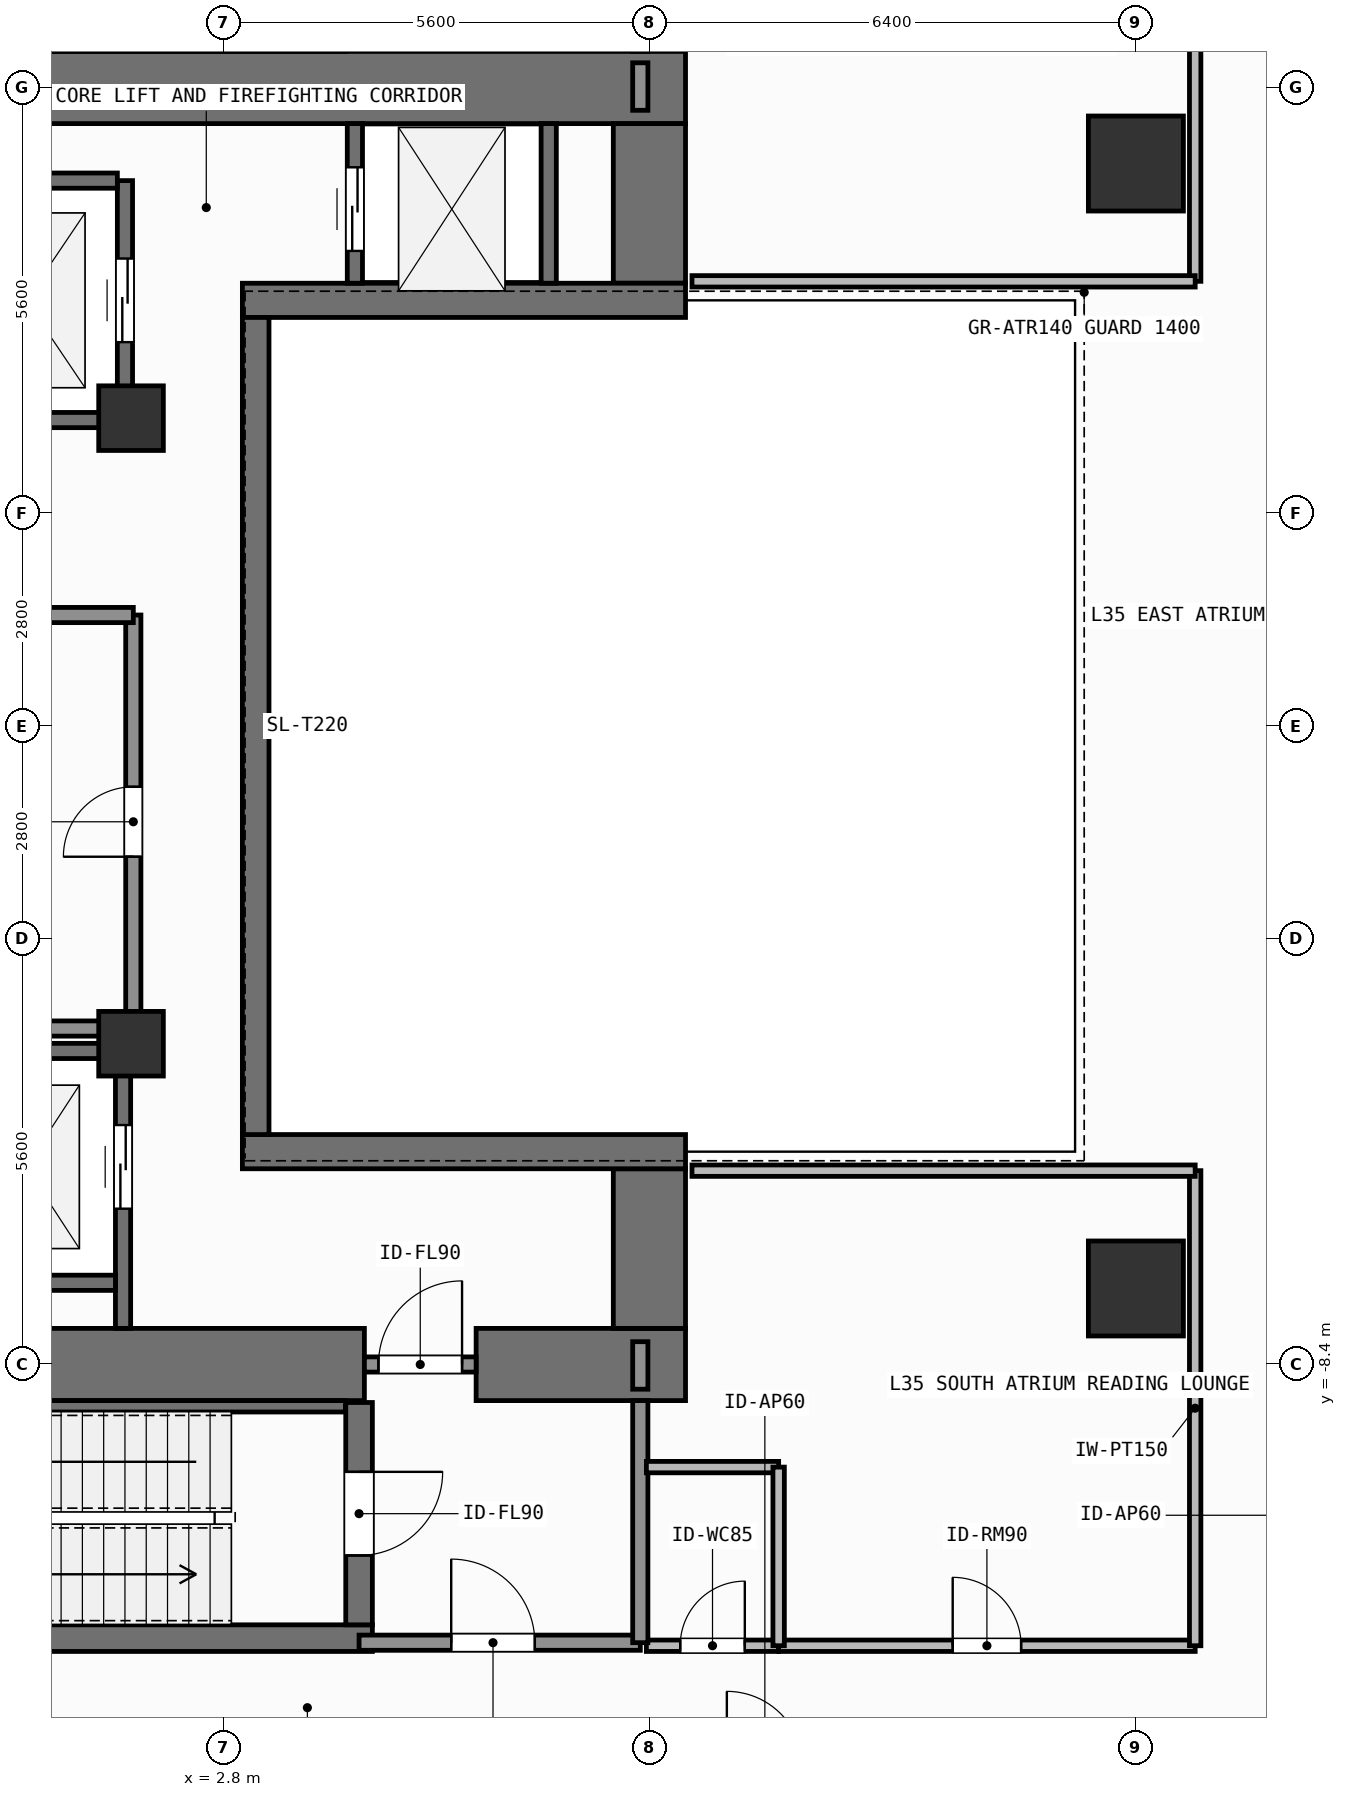
"""IFC4 building model, lengths in metres.
Left out: names, types, materials, properties, quantities, classifications, styles, units other than length and angle.
Written with IfcOpenShell. Run it as: python <this file> out.ifc"""

import sys

from ifc_helpers import new_model, si_unit, direction, frame, frame_2d, origin, origin_2d, place, context, subcontext, project, spatial, rectangle, extrude, element, fill, save


model = new_model("IFC4")
c1 = context("Model", 3, precision=1e-05, world=origin(), true_north=direction((0.0, 1.0)))
c2 = subcontext(c1, "Body", "Model", "MODEL_VIEW")
j1 = project(units=[si_unit("LENGTHUNIT", "METRE"), si_unit("PLANEANGLEUNIT", "RADIAN")], contexts=[c1])
p1 = place(None, origin())
s1 = spatial("IfcSite", under=j1, at=p1, CompositionType="ELEMENT")
p2 = place(p1, origin())
s2 = spatial("IfcBuilding", under=s1, at=p2, CompositionType="ELEMENT")
p3 = place(p2, frame((0.0, 0.0, 140.7)))
s3 = spatial("IfcBuildingStorey", under=s2, at=p3, CompositionType="ELEMENT", Elevation=140.7)
p4 = place(p3, frame((-2.62, -8.4, 0.0), z_axis=(0.0, 0.0, 1.0), x_axis=(1.0, 0.0, 0.0)))
e1 = element("IfcWall", 1, at=p4, inside=s3, PredefinedType="SHEAR", context=c2, shape_type="SweptSolid", body=[
    extrude(rectangle(XDim=7.27, YDim=0.95, at=frame_2d((3.635, 0.0))), origin(), (0.0, 0.0, 1.0), 3.9),
])
p5 = place(p3, frame((6.12, -8.4, 0.0), z_axis=(0.0, 0.0, 1.0), x_axis=(1.0, 0.0, 0.0)))
e2 = element("IfcWall", 2, at=p5, inside=s3, PredefinedType="SHEAR", context=c2, shape_type="SweptSolid", body=[
    extrude(rectangle(XDim=2.755, YDim=0.95, at=frame_2d((1.377, 0.0))), origin(), (0.0, 0.0, 1.0), 3.9),
])
p6 = place(p3, frame((-7.55, 8.4, 0.0), z_axis=(0.0, 0.0, 1.0), x_axis=(1.0, 0.0, 0.0)))
e3 = element("IfcWall", 3, at=p6, inside=s3, PredefinedType="SHEAR", context=c2, shape_type="SweptSolid", body=[
    extrude(rectangle(XDim=16.425, YDim=0.95, at=frame_2d((8.212, 0.0))), origin(), (0.0, 0.0, 1.0), 3.9),
])
for number, where, z_axis, x_axis in (
    (4, (8.4, -7.925, 0.0), (0.0, 0.0, 1.0), (0.0, 1.0, 0.0)),
    (5, (8.4, 5.825, 0.0), (0.0, 0.0, 1.0), (0.0, 1.0, 0.0)),
):
    element("IfcWall", number, at=place(p3, frame(where, z_axis=z_axis, x_axis=x_axis)), inside=s3, PredefinedType="SHEAR", context=c2, shape_type="SweptSolid", body=[
        extrude(rectangle(XDim=2.1, YDim=0.95, at=frame_2d((1.05, 0.0))), origin(), (0.0, 0.0, 1.0), 3.9),
    ])
for number, where, z_axis, x_axis in (
    (6, (3.045, -5.6, 0.0), (0.0, 0.0, 1.0), (1.0, 0.0, 0.0)),
    (7, (3.045, 5.6, 0.0), (0.0, 0.0, 1.0), (1.0, 0.0, 0.0)),
):
    element("IfcWall", number, at=place(p3, frame(where, z_axis=z_axis, x_axis=x_axis)), inside=s3, PredefinedType="SHEAR", context=c2, shape_type="SweptSolid", body=[
        extrude(rectangle(XDim=5.83, YDim=0.45, at=frame_2d((2.915, 0.0))), origin(), (0.0, 0.0, 1.0), 3.9),
    ])
p7 = place(p3, frame((3.22, -5.375, 0.0), z_axis=(0.0, 0.0, 1.0), x_axis=(0.0, 1.0, 0.0)))
e8 = element("IfcWall", 8, at=p7, inside=s3, PredefinedType="SHEAR", context=c2, shape_type="SweptSolid", body=[
    extrude(rectangle(XDim=10.75, YDim=0.35, at=frame_2d((5.375, 0.0))), origin(), (0.0, 0.0, 1.0), 3.9),
])
p8 = place(p3, frame((-2.555, -12.0, 0.0), z_axis=(0.0, 0.0, 1.0), x_axis=(1.0, 0.0, 0.0)))
e9 = element("IfcWall", 9, at=p8, inside=s3, PredefinedType="SHEAR", context=c2, shape_type="SweptSolid", body=[
    extrude(rectangle(XDim=7.31, YDim=0.35, at=frame_2d((3.655, 0.0))), origin(), (0.0, 0.0, 1.0), 3.9),
])
p9 = place(p3, frame((-2.2, -8.95, 0.0), z_axis=(0.0, 0.0, 1.0), x_axis=(1.0, 0.0, 0.0)))
e10 = element("IfcWall", 10, at=p9, inside=s3, PredefinedType="SHEAR", context=c2, shape_type="SweptSolid", body=[
    extrude(rectangle(XDim=6.6, YDim=0.15, at=frame_2d((3.3, 0.0))), origin(), (0.0, 0.0, 1.0), 3.9),
])
p10 = place(p3, frame((4.58, -8.9, 0.0), z_axis=(0.0, 0.0, 1.0), x_axis=(0.0, -1.0, 0.0)))
e11 = element("IfcWall", 11, at=p10, inside=s3, PredefinedType="SHEAR", context=c2, shape_type="SweptSolid", body=[
    extrude(rectangle(XDim=2.925, YDim=0.35, at=frame_2d((1.462, 0.0))), origin(), (0.0, 0.0, 1.0), 3.9),
])
p11 = place(p10, frame((0.913, 0.0, 0.0)))
e12 = element("IfcOpeningElement", 12, at=p11, cuts=e11, PredefinedType="OPENING", context=c2, shape_type="SweptSolid", body=[
    extrude(rectangle(XDim=1.1, YDim=2.15, at=frame_2d((0.55, 1.075))), frame((0.0, 0.185, 0.0), z_axis=(0.0, -1.0, 0.0), x_axis=(1.0, 0.0, 0.0)), (0.0, 0.0, 1.0), 0.37),
])
for number, where, z_axis, x_axis in (
    (13, (14.8, -7.4, 0.0), (0.0, 0.0, 1.0), (1.0, 0.0, 0.0)),
    (14, (14.8, 7.4, 0.0), (0.0, 0.0, 1.0), (1.0, 0.0, 0.0)),
):
    element("IfcColumn", number, at=place(p3, frame(where, z_axis=z_axis, x_axis=x_axis)), inside=s3, PredefinedType="COLUMN", context=c2, shape_type="SweptSolid", body=[
        extrude(rectangle(XDim=1.25, YDim=1.25, at=origin_2d()), origin(), (0.0, 0.0, 1.0), 3.9),
    ])
for number, where, z_axis, x_axis in (
    (15, (1.58, -4.18, 0.0), (0.0, 0.0, 1.0), (1.0, 0.0, 0.0)),
    (16, (1.58, 4.05, 0.0), (0.0, 0.0, 1.0), (1.0, 0.0, 0.0)),
):
    element("IfcColumn", number, at=place(p3, frame(where, z_axis=z_axis, x_axis=x_axis)), inside=s3, PredefinedType="COLUMN", context=c2, shape_type="SweptSolid", body=[
        extrude(rectangle(XDim=0.85, YDim=0.85, at=origin_2d()), origin(), (0.0, 0.0, 1.0), 3.9),
    ])
p12 = place(p3, frame((1.5, 4.025, 0.0), z_axis=(0.0, 0.0, 1.0), x_axis=(0.0, 1.0, 0.0)))
e17 = element("IfcWall", 17, at=p12, inside=s3, PredefinedType="SHEAR", context=c2, shape_type="SweptSolid", body=[
    extrude(rectangle(XDim=3.15, YDim=0.2, at=frame_2d((1.575, 0.0))), origin(), (0.0, 0.0, 1.0), 3.68),
])
p13 = place(p12, frame((1.025, 0.0, 0.0)))
e18 = element("IfcOpeningElement", 18, at=p13, cuts=e17, PredefinedType="OPENING", context=c2, shape_type="SweptSolid", body=[
    extrude(rectangle(XDim=1.1, YDim=2.2, at=frame_2d((0.55, 1.1))), frame((0.0, 0.11, 0.0), z_axis=(0.0, -1.0, 0.0), x_axis=(1.0, 0.0, 0.0)), (0.0, 0.0, 1.0), 0.22),
])
for number, where, z_axis, x_axis in (
    (19, (-1.0, 4.025, 0.0), (0.0, 0.0, 1.0), (1.0, 0.0, 0.0)),
    (20, (-1.0, 7.175, 0.0), (0.0, 0.0, 1.0), (1.0, 0.0, 0.0)),
):
    element("IfcWall", number, at=place(p3, frame(where, z_axis=z_axis, x_axis=x_axis)), inside=s3, PredefinedType="SHEAR", context=c2, shape_type="SweptSolid", body=[
        extrude(rectangle(XDim=2.4, YDim=0.2, at=frame_2d((1.2, 0.0))), origin(), (0.0, 0.0, 1.0), 3.68),
    ])
p14 = place(p3, frame((1.475, -7.925, 0.0), z_axis=(0.0, 0.0, 1.0), x_axis=(0.0, 1.0, 0.0)))
e21 = element("IfcWall", 21, at=p14, inside=s3, PredefinedType="SHEAR", context=c2, shape_type="SweptSolid", body=[
    extrude(rectangle(XDim=3.65, YDim=0.2, at=frame_2d((1.825, 0.0))), origin(), (0.0, 0.0, 1.0), 3.68),
])
p15 = place(p14, frame((1.575, 0.0, 0.0)))
e22 = element("IfcOpeningElement", 22, at=p15, cuts=e21, PredefinedType="OPENING", context=c2, shape_type="SweptSolid", body=[
    extrude(rectangle(XDim=1.1, YDim=2.2, at=frame_2d((0.55, 1.1))), frame((0.0, 0.11, 0.0), z_axis=(0.0, -1.0, 0.0), x_axis=(1.0, 0.0, 0.0)), (0.0, 0.0, 1.0), 0.22),
])
for number, where, z_axis, x_axis in (
    (23, (-0.975, -7.325, 0.0), (0.0, 0.0, 1.0), (1.0, 0.0, 0.0)),
    (24, (-0.975, -4.275, 0.0), (0.0, 0.0, 1.0), (1.0, 0.0, 0.0)),
):
    element("IfcWall", number, at=place(p3, frame(where, z_axis=z_axis, x_axis=x_axis)), inside=s3, PredefinedType="SHEAR", context=c2, shape_type="SweptSolid", body=[
        extrude(rectangle(XDim=2.35, YDim=0.2, at=frame_2d((1.175, 0.0))), origin(), (0.0, 0.0, 1.0), 3.68),
    ])
p16 = place(p3, frame((4.525, 5.825, 0.0), z_axis=(0.0, 0.0, 1.0), x_axis=(0.0, 1.0, 0.0)))
e25 = element("IfcWall", 25, at=p16, inside=s3, PredefinedType="SHEAR", context=c2, shape_type="SweptSolid", body=[
    extrude(rectangle(XDim=2.1, YDim=0.2, at=frame_2d((1.05, 0.0))), origin(), (0.0, 0.0, 1.0), 3.68),
])
p17 = place(p16, frame((0.425, 0.0, 0.0)))
e26 = element("IfcOpeningElement", 26, at=p17, cuts=e25, PredefinedType="OPENING", context=c2, shape_type="SweptSolid", body=[
    extrude(rectangle(XDim=1.1, YDim=2.2, at=frame_2d((0.55, 1.1))), frame((0.0, 0.11, 0.0), z_axis=(0.0, -1.0, 0.0), x_axis=(1.0, 0.0, 0.0)), (0.0, 0.0, 1.0), 0.22),
])
p18 = place(p3, frame((7.075, 5.825, 0.0), z_axis=(0.0, 0.0, 1.0), x_axis=(0.0, 1.0, 0.0)))
e27 = element("IfcWall", 27, at=p18, inside=s3, PredefinedType="SHEAR", context=c2, shape_type="SweptSolid", body=[
    extrude(rectangle(XDim=2.1, YDim=0.2, at=frame_2d((1.05, 0.0))), origin(), (0.0, 0.0, 1.0), 3.68),
])
p19 = place(p3, frame((4.58, -12.06, 0.0), z_axis=(0.0, 0.0, 1.0), x_axis=(1.0, 0.0, 0.0)))
e28 = element("IfcWall", 28, at=p19, inside=s3, PredefinedType="SOLIDWALL", context=c2, shape_type="SweptSolid", body=[
    extrude(rectangle(XDim=3.7, YDim=0.2, at=frame_2d((1.85, 0.0))), origin(), (0.0, 0.0, 1.0), 3.68),
])
p20 = place(p19, frame((1.212, 0.0, 0.0)))
e29 = element("IfcOpeningElement", 29, at=p20, cuts=e28, PredefinedType="OPENING", context=c2, shape_type="SweptSolid", body=[
    extrude(rectangle(XDim=1.1, YDim=2.15, at=frame_2d((0.55, 1.075))), frame((0.0, 0.11, 0.0), z_axis=(0.0, -1.0, 0.0), x_axis=(1.0, 0.0, 0.0)), (0.0, 0.0, 1.0), 0.22),
])
p21 = place(p3, frame((4.65, -8.4, 0.0), z_axis=(0.0, 0.0, 1.0), x_axis=(1.0, 0.0, 0.0)))
e30 = element("IfcWall", 30, at=p21, inside=s3, PredefinedType="SOLIDWALL", context=c2, shape_type="SweptSolid", body=[
    extrude(rectangle(XDim=1.47, YDim=0.2, at=frame_2d((0.735, 0.0))), origin(), (0.0, 0.0, 1.0), 2.72),
])
p22 = place(p21, frame((0.185, 0.0, 0.0)))
e31 = element("IfcOpeningElement", 31, at=p22, cuts=e30, PredefinedType="OPENING", context=c2, shape_type="SweptSolid", body=[
    extrude(rectangle(XDim=1.1, YDim=2.15, at=frame_2d((0.55, 1.075))), frame((0.0, 0.11, 0.0), z_axis=(0.0, -1.0, 0.0), x_axis=(1.0, 0.0, 0.0)), (0.0, 0.0, 1.0), 0.22),
])
p23 = place(p3, frame((1.61, -3.98, 0.0), z_axis=(0.0, 0.0, 1.0), x_axis=(0.0, 1.0, 0.0)))
e32 = element("IfcWall", 32, at=p23, inside=s3, PredefinedType="SOLIDWALL", context=c2, shape_type="SweptSolid", body=[
    extrude(rectangle(XDim=5.44, YDim=0.2, at=frame_2d((2.72, 0.0))), origin(), (0.0, 0.0, 1.0), 3.68),
])
p24 = place(p23, frame((2.26, 0.0, 0.0)))
e33 = element("IfcOpeningElement", 33, at=p24, cuts=e32, PredefinedType="OPENING", context=c2, shape_type="SweptSolid", body=[
    extrude(rectangle(XDim=0.92, YDim=2.1, at=frame_2d((0.46, 1.05))), frame((0.0, 0.11, 0.0), z_axis=(0.0, -1.0, 0.0), x_axis=(1.0, 0.0, 0.0)), (0.0, 0.0, 1.0), 0.22),
])
p25 = place(p3, frame((8.36, -12.1, 0.0), z_axis=(0.0, 0.0, 1.0), x_axis=(1.0, 0.0, 0.0)))
e34 = element("IfcWall", 34, at=p25, inside=s3, PredefinedType="PARTITIONING", context=c2, shape_type="SweptSolid", body=[
    extrude(rectangle(XDim=1.74, YDim=0.15, at=frame_2d((0.87, 0.0))), origin(), (0.0, 0.0, 1.0), 3.68),
])
p26 = place(p25, frame((0.445, 0.0, 0.0)))
e35 = element("IfcOpeningElement", 35, at=p26, cuts=e34, PredefinedType="OPENING", context=c2, shape_type="SweptSolid", body=[
    extrude(rectangle(XDim=0.85, YDim=2.1, at=frame_2d((0.425, 1.05))), frame((0.0, 0.085, 0.0), z_axis=(0.0, -1.0, 0.0), x_axis=(1.0, 0.0, 0.0)), (0.0, 0.0, 1.0), 0.17),
])
p27 = place(p3, frame((10.1, -12.1, 0.0), z_axis=(0.0, 0.0, 1.0), x_axis=(1.0, 0.0, 0.0)))
e36 = element("IfcWall", 36, at=p27, inside=s3, PredefinedType="PARTITIONING", context=c2, shape_type="SweptSolid", body=[
    extrude(rectangle(XDim=5.48, YDim=0.15, at=frame_2d((2.74, 0.0))), origin(), (0.0, 0.0, 1.0), 3.68),
])
p28 = place(p27, frame((2.29, 0.0, 0.0)))
e37 = element("IfcOpeningElement", 37, at=p28, cuts=e36, PredefinedType="OPENING", context=c2, shape_type="SweptSolid", body=[
    extrude(rectangle(XDim=0.9, YDim=2.1, at=frame_2d((0.45, 1.05))), frame((0.0, 0.085, 0.0), z_axis=(0.0, -1.0, 0.0), x_axis=(1.0, 0.0, 0.0)), (0.0, 0.0, 1.0), 0.17),
])
p29 = place(p3, frame((8.28, -12.06, 0.0), z_axis=(0.0, 0.0, 1.0), x_axis=(0.0, 1.0, 0.0)))
e38 = element("IfcWall", 38, at=p29, inside=s3, PredefinedType="SOLIDWALL", context=c2, shape_type="SweptSolid", body=[
    extrude(rectangle(XDim=3.185, YDim=0.2, at=frame_2d((1.593, 0.0))), origin(), (0.0, 0.0, 1.0), 3.68),
])
for number, where, z_axis, x_axis in (
    (39, (-1.58, -3.98, 0.0), (0.0, 0.0, 1.0), (1.0, 0.0, 0.0)),
    (40, (-1.58, 1.46, 0.0), (0.0, 0.0, 1.0), (1.0, 0.0, 0.0)),
):
    element("IfcWall", number, at=place(p3, frame(where, z_axis=z_axis, x_axis=x_axis)), inside=s3, PredefinedType="SOLIDWALL", context=c2, shape_type="SweptSolid", body=[
        extrude(rectangle(XDim=3.19, YDim=0.2, at=frame_2d((1.595, 0.0))), origin(), (0.0, 0.0, 1.0), 3.68),
    ])
p30 = place(p3, frame((8.28, -8.725, 0.0), z_axis=(0.0, 0.0, 1.0), x_axis=(0.0, 1.0, 0.0)))
e41 = element("IfcWall", 41, at=p30, inside=s3, PredefinedType="SOLIDWALL", context=c2, shape_type="SweptSolid", body=[
    extrude(rectangle(XDim=0.625, YDim=0.2, at=frame_2d((0.312, 0.0))), origin(), (0.0, 0.0, 1.0), 3.68),
])
p31 = place(p3, frame((8.36, -9.75, 0.0), z_axis=(0.0, 0.0, 1.0), x_axis=(1.0, 0.0, 0.0)))
e42 = element("IfcWall", 42, at=p31, inside=s3, PredefinedType="PARTITIONING", context=c2, shape_type="SweptSolid", body=[
    extrude(rectangle(XDim=1.74, YDim=0.15, at=frame_2d((0.87, 0.0))), origin(), (0.0, 0.0, 1.0), 3.68),
])
p32 = place(p3, frame((10.1, -12.1, 0.0), z_axis=(0.0, 0.0, 1.0), x_axis=(0.0, 1.0, 0.0)))
e43 = element("IfcWall", 43, at=p32, inside=s3, PredefinedType="PARTITIONING", context=c2, shape_type="SweptSolid", body=[
    extrude(rectangle(XDim=2.35, YDim=0.15, at=frame_2d((1.175, 0.0))), origin(), (0.0, 0.0, 1.0), 3.68),
])
p33 = place(p3, frame((15.58, -12.1, 0.0), z_axis=(0.0, 0.0, 1.0), x_axis=(0.0, 1.0, 0.0)))
e44 = element("IfcWall", 44, at=p33, inside=s3, PredefinedType="PARTITIONING", context=c2, shape_type="SweptSolid", body=[
    extrude(rectangle(XDim=6.25, YDim=0.15, at=frame_2d((3.125, 0.0))), origin(), (0.0, 0.0, 1.0), 3.68),
])
p34 = place(p3, frame((8.96, -5.85, 0.0), z_axis=(0.0, 0.0, 1.0), x_axis=(1.0, 0.0, 0.0)))
e45 = element("IfcWall", 45, at=p34, inside=s3, PredefinedType="PARTITIONING", context=c2, shape_type="SweptSolid", body=[
    extrude(rectangle(XDim=6.62, YDim=0.15, at=frame_2d((3.31, 0.0))), origin(), (0.0, 0.0, 1.0), 3.68),
])
p35 = place(p3, frame((8.28, 8.1, 0.0), z_axis=(0.0, 0.0, 1.0), x_axis=(0.0, 1.0, 0.0)))
e46 = element("IfcWall", 46, at=p35, inside=s3, PredefinedType="SOLIDWALL", context=c2, shape_type="SweptSolid", body=[
    extrude(rectangle(XDim=0.625, YDim=0.2, at=frame_2d((0.312, 0.0))), origin(), (0.0, 0.0, 1.0), 3.68),
])
p36 = place(p3, frame((15.58, 5.85, 0.0), z_axis=(0.0, 0.0, 1.0), x_axis=(0.0, 1.0, 0.0)))
e47 = element("IfcWall", 47, at=p36, inside=s3, PredefinedType="PARTITIONING", context=c2, shape_type="SweptSolid", body=[
    extrude(rectangle(XDim=6.25, YDim=0.15, at=frame_2d((3.125, 0.0))), origin(), (0.0, 0.0, 1.0), 3.68),
])
p37 = place(p3, frame((8.96, 5.85, 0.0), z_axis=(0.0, 0.0, 1.0), x_axis=(1.0, 0.0, 0.0)))
e48 = element("IfcWall", 48, at=p37, inside=s3, PredefinedType="PARTITIONING", context=c2, shape_type="SweptSolid", body=[
    extrude(rectangle(XDim=6.62, YDim=0.15, at=frame_2d((3.31, 0.0))), origin(), (0.0, 0.0, 1.0), 3.68),
])
p38 = place(p13, origin())
e49 = element("IfcDoor", 49, at=p38, inside=s3, OperationType="SLIDING_TO_LEFT", PredefinedType="DOOR", context=c2, shape_type="SweptSolid", body=[
    extrude(rectangle(XDim=1.1, YDim=2.2, at=frame_2d((0.55, 1.1))), frame((0.0, 0.025, 0.0), z_axis=(0.0, -1.0, 0.0), x_axis=(1.0, 0.0, 0.0)), (0.0, 0.0, 1.0), 0.05),
])
fill(e18, e49)
p39 = place(p15, origin())
e50 = element("IfcDoor", 50, at=p39, inside=s3, OperationType="SLIDING_TO_LEFT", PredefinedType="DOOR", context=c2, shape_type="SweptSolid", body=[
    extrude(rectangle(XDim=1.1, YDim=2.2, at=frame_2d((0.55, 1.1))), frame((0.0, 0.025, 0.0), z_axis=(0.0, -1.0, 0.0), x_axis=(1.0, 0.0, 0.0)), (0.0, 0.0, 1.0), 0.05),
])
fill(e22, e50)
p40 = place(p17, origin())
e51 = element("IfcDoor", 51, at=p40, inside=s3, OperationType="SLIDING_TO_LEFT", PredefinedType="DOOR", context=c2, shape_type="SweptSolid", body=[
    extrude(rectangle(XDim=1.1, YDim=2.2, at=frame_2d((0.55, 1.1))), frame((0.0, 0.025, 0.0), z_axis=(0.0, -1.0, 0.0), x_axis=(1.0, 0.0, 0.0)), (0.0, 0.0, 1.0), 0.05),
])
fill(e26, e51)
p41 = place(p11, origin())
e52 = element("IfcDoor", 52, at=p41, inside=s3, OperationType="SINGLE_SWING_LEFT", PredefinedType="DOOR", context=c2, shape_type="SweptSolid", body=[
    extrude(rectangle(XDim=1.1, YDim=2.15, at=frame_2d((0.55, 1.075))), frame((0.0, 0.025, 0.0), z_axis=(0.0, -1.0, 0.0), x_axis=(1.0, 0.0, 0.0)), (0.0, 0.0, 1.0), 0.05),
])
fill(e12, e52)
p42 = place(p20, origin())
e53 = element("IfcDoor", 53, at=p42, inside=s3, OperationType="SINGLE_SWING_LEFT", PredefinedType="DOOR", context=c2, shape_type="SweptSolid", body=[
    extrude(rectangle(XDim=1.1, YDim=2.15, at=frame_2d((0.55, 1.075))), frame((0.0, 0.025, 0.0), z_axis=(0.0, -1.0, 0.0), x_axis=(1.0, 0.0, 0.0)), (0.0, 0.0, 1.0), 0.05),
])
fill(e29, e53)
p43 = place(p22, origin())
e54 = element("IfcDoor", 54, at=p43, inside=s3, OperationType="SINGLE_SWING_RIGHT", PredefinedType="DOOR", context=c2, shape_type="SweptSolid", body=[
    extrude(rectangle(XDim=1.1, YDim=2.15, at=frame_2d((0.55, 1.075))), frame((0.0, 0.025, 0.0), z_axis=(0.0, -1.0, 0.0), x_axis=(1.0, 0.0, 0.0)), (0.0, 0.0, 1.0), 0.05),
])
fill(e31, e54)
p44 = place(p24, origin())
e55 = element("IfcDoor", 55, at=p44, inside=s3, OperationType="SINGLE_SWING_LEFT", PredefinedType="DOOR", context=c2, shape_type="SweptSolid", body=[
    extrude(rectangle(XDim=0.92, YDim=2.1, at=frame_2d((0.46, 1.05))), frame((0.0, 0.025, 0.0), z_axis=(0.0, -1.0, 0.0), x_axis=(1.0, 0.0, 0.0)), (0.0, 0.0, 1.0), 0.05),
])
fill(e33, e55)
p45 = place(p26, origin())
e56 = element("IfcDoor", 56, at=p45, inside=s3, OperationType="SINGLE_SWING_RIGHT", PredefinedType="DOOR", context=c2, shape_type="SweptSolid", body=[
    extrude(rectangle(XDim=0.85, YDim=2.1, at=frame_2d((0.425, 1.05))), frame((0.0, 0.025, 0.0), z_axis=(0.0, -1.0, 0.0), x_axis=(1.0, 0.0, 0.0)), (0.0, 0.0, 1.0), 0.05),
])
fill(e35, e56)
p46 = place(p28, origin())
e57 = element("IfcDoor", 57, at=p46, inside=s3, OperationType="SINGLE_SWING_LEFT", PredefinedType="DOOR", context=c2, shape_type="SweptSolid", body=[
    extrude(rectangle(XDim=0.9, YDim=2.1, at=frame_2d((0.45, 1.05))), frame((0.0, 0.025, 0.0), z_axis=(0.0, -1.0, 0.0), x_axis=(1.0, 0.0, 0.0)), (0.0, 0.0, 1.0), 0.05),
])
fill(e37, e57)
save(model, sys.argv[1])
